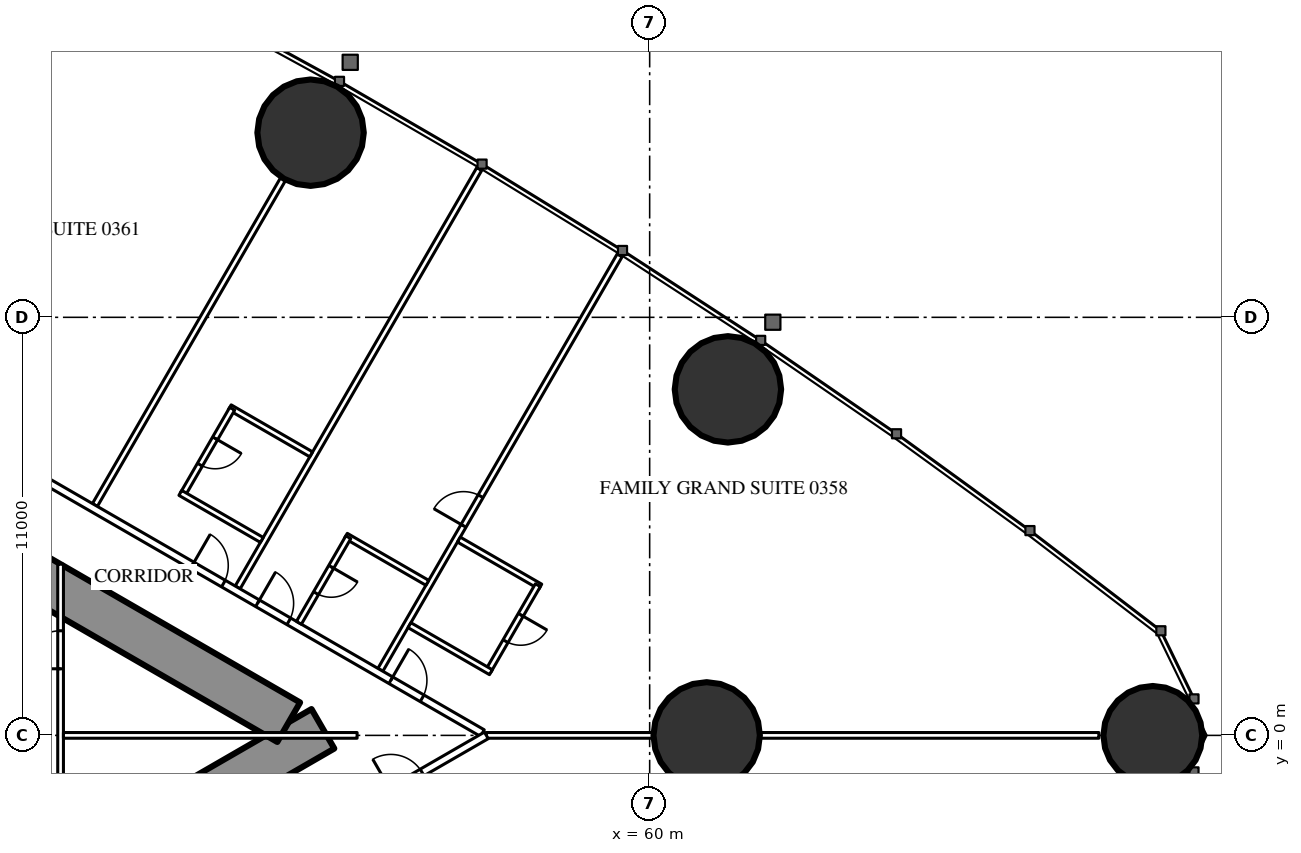
"""IFC4 building model, lengths in metres.
Left out: names, types, materials, properties, quantities, classifications, styles, units other than length and angle.
Written with IfcOpenShell. Run it as: python <this file> out.ifc"""

import sys

from ifc_helpers import new_model, si_unit, direction, frame, frame_2d, origin, origin_2d, place, context, subcontext, project, spatial, rectangle, hollow_circle, extrude, element, fill, save


model = new_model("IFC4")
c1 = context("Model", 3, precision=1e-05, world=origin(), true_north=direction((0.0, 1.0)))
c2 = subcontext(c1, "Body", "Model", "MODEL_VIEW")
j1 = project(units=[si_unit("LENGTHUNIT", "METRE"), si_unit("PLANEANGLEUNIT", "RADIAN")], contexts=[c1])
p1 = place(None, origin())
s1 = spatial("IfcSite", under=j1, at=p1, CompositionType="ELEMENT")
p2 = place(p1, origin())
s2 = spatial("IfcBuilding", under=s1, at=p2, CompositionType="ELEMENT")
p3 = place(p2, frame((0.0, 0.0, 18.0)))
s3 = spatial("IfcBuildingStorey", under=s2, at=p3, CompositionType="ELEMENT", Elevation=18.0)
p4 = place(p3, frame((73.239, 0.0, 0.0), z_axis=(0.0, 0.0, 1.0), x_axis=(1.0, 0.0, 0.0)))
e1 = element("IfcColumn", 1, at=p4, inside=s3, PredefinedType="COLUMN", context=c2, shape_type="SweptSolid", body=[
    extrude(hollow_circle(Radius=1.3, WallThickness=0.1, at=origin_2d()), origin(), (0.0, 0.0, 1.0), 3.5),
])
for number, where, z_axis, x_axis in (
    (2, (62.059, 9.105, 0.0), (0.0, 0.0, 1.0), (1.0, 0.0, 0.0)),
    (3, (51.078, 15.858, 0.0), (0.0, 0.0, 1.0), (1.0, 0.0, 0.0)),
):
    element("IfcColumn", number, at=place(p3, frame(where, z_axis=z_axis, x_axis=x_axis)), inside=s3, PredefinedType="COLUMN", context=c2, shape_type="SweptSolid", body=[
        extrude(hollow_circle(Radius=1.4, WallThickness=0.12, at=origin_2d()), origin(), (0.0, 0.0, 1.0), 3.5),
    ])
p5 = place(p3, frame((61.5, 0.0, 0.0), z_axis=(0.0, 0.0, 1.0), x_axis=(1.0, 0.0, 0.0)))
e4 = element("IfcColumn", 4, at=p5, inside=s3, PredefinedType="COLUMN", context=c2, shape_type="SweptSolid", body=[
    extrude(hollow_circle(Radius=1.4, WallThickness=0.1, at=origin_2d()), origin(), (0.0, 0.0, 1.0), 3.5),
])
p6 = place(p3, frame((27.2, -13.8, 0.0), z_axis=(0.0, 0.0, 1.0), x_axis=(0.866027159892, 0.499996958321, 0.0)))
e5 = element("IfcWall", 5, at=p6, inside=s3, PredefinedType="SHEAR", context=c2, shape_type="SweptSolid", body=[
    extrude(rectangle(XDim=27.947, YDim=1.2, at=frame_2d((13.973, 0.0))), origin(), (0.0, 0.0, 1.0), 3.5),
])
p7 = place(p6, frame((4.6, 0.0, 0.0)))
e6 = element("IfcOpeningElement", 6, at=p7, cuts=e5, PredefinedType="OPENING", context=c2, shape_type="SweptSolid", body=[
    extrude(rectangle(XDim=1.0, YDim=2.2, at=frame_2d((0.5, 1.1))), frame((0.0, 0.61, 0.0), z_axis=(0.0, -1.0, 0.0), x_axis=(1.0, 0.0, 0.0)), (0.0, 0.0, 1.0), 1.22),
])
p8 = place(p6, frame((13.395, 0.0, 0.0)))
e7 = element("IfcOpeningElement", 7, at=p8, cuts=e5, PredefinedType="OPENING", context=c2, shape_type="SweptSolid", body=[
    extrude(rectangle(XDim=1.8, YDim=2.2, at=frame_2d((0.9, 1.1))), frame((0.0, 0.61, 0.0), z_axis=(0.0, -1.0, 0.0), x_axis=(1.0, 0.0, 0.0)), (0.0, 0.0, 1.0), 1.22),
])
p9 = place(p3, frame((27.2, 13.8, 0.0), z_axis=(0.0, 0.0, 1.0), x_axis=(0.866024515034, -0.500001539357, 0.0)))
e8 = element("IfcWall", 8, at=p9, inside=s3, PredefinedType="SHEAR", context=c2, shape_type="SweptSolid", body=[
    extrude(rectangle(XDim=26.907, YDim=1.2, at=frame_2d((13.454, 0.0))), origin(), (0.0, 0.0, 1.0), 3.5),
])
p10 = place(p9, frame((4.6, 0.0, 0.0)))
e9 = element("IfcOpeningElement", 9, at=p10, cuts=e8, PredefinedType="OPENING", context=c2, shape_type="SweptSolid", body=[
    extrude(rectangle(XDim=1.0, YDim=2.2, at=frame_2d((0.5, 1.1))), frame((0.0, 0.61, 0.0), z_axis=(0.0, -1.0, 0.0), x_axis=(1.0, 0.0, 0.0)), (0.0, 0.0, 1.0), 1.22),
])
p11 = place(p9, frame((13.395, 0.0, 0.0)))
e10 = element("IfcOpeningElement", 10, at=p11, cuts=e8, PredefinedType="OPENING", context=c2, shape_type="SweptSolid", body=[
    extrude(rectangle(XDim=1.8, YDim=2.2, at=frame_2d((0.9, 1.1))), frame((0.0, 0.61, 0.0), z_axis=(0.0, -1.0, 0.0), x_axis=(1.0, 0.0, 0.0)), (0.0, 0.0, 1.0), 1.22),
])
p12 = place(p3, frame((45.403, 6.062, 0.0), z_axis=(0.0, 0.0, 1.0), x_axis=(0.500013434677, 0.866017647131, 0.0)))
e11 = element("IfcWall", 11, at=p12, inside=s3, PredefinedType="PARTITIONING", context=c2, shape_type="SweptSolid", body=[
    extrude(rectangle(XDim=9.902, YDim=0.15, at=frame_2d((4.951, 0.0))), origin(), (0.0, 0.0, 1.0), 2.25),
])
p13 = place(p3, frame((49.159, 3.893, 0.0), z_axis=(0.0, 0.0, 1.0), x_axis=(0.499995664361, 0.866027906952, 0.0)))
e12 = element("IfcWall", 12, at=p13, inside=s3, PredefinedType="PARTITIONING", context=c2, shape_type="SweptSolid", body=[
    extrude(rectangle(XDim=12.711, YDim=0.15, at=frame_2d((6.356, 0.0))), origin(), (0.0, 0.0, 1.0), 3.25),
])
p14 = place(p3, frame((52.915, 1.725, 0.0), z_axis=(0.0, 0.0, 1.0), x_axis=(0.499997163113, 0.866027041656, 0.0)))
e13 = element("IfcWall", 13, at=p14, inside=s3, PredefinedType="PARTITIONING", context=c2, shape_type="SweptSolid", body=[
    extrude(rectangle(XDim=12.591, YDim=0.15, at=frame_2d((6.295, 0.0))), origin(), (0.0, 0.0, 1.0), 3.25),
])
p15 = place(p14, frame((4.375, 0.0, 0.0)))
e14 = element("IfcOpeningElement", 14, at=p15, cuts=e13, PredefinedType="OPENING", context=c2, shape_type="SweptSolid", body=[
    extrude(rectangle(XDim=0.9, YDim=2.2, at=frame_2d((0.45, 1.1))), frame((0.0, 0.085, 0.0), z_axis=(0.0, -1.0, 0.0), x_axis=(1.0, 0.0, 0.0)), (0.0, 0.0, 1.0), 0.17),
])
p16 = place(p3, frame((55.702, 0.0, 0.0), z_axis=(0.0, 0.0, 1.0), x_axis=(1.0, 0.0, 0.0)))
e15 = element("IfcWall", 15, at=p16, inside=s3, PredefinedType="PARTITIONING", context=c2, shape_type="SweptSolid", body=[
    extrude(rectangle(XDim=16.117, YDim=0.15, at=frame_2d((8.059, 0.0))), origin(), (0.0, 0.0, 1.0), 2.25),
])
p17 = place(p3, frame((36.834, 10.894, 0.0), z_axis=(0.0, 0.0, 1.0), x_axis=(0.866028157229, -0.499995230863, 0.0)))
e16 = element("IfcWall", 16, at=p17, inside=s3, PredefinedType="PARTITIONING", context=c2, shape_type="SweptSolid", body=[
    extrude(rectangle(XDim=21.667, YDim=0.2, at=frame_2d((10.833, 0.0))), origin(), (0.0, 0.0, 1.0), 3.25),
])
p18 = place(p17, frame((18.885, 0.0, 0.0)))
e17 = element("IfcOpeningElement", 17, at=p18, cuts=e16, PredefinedType="OPENING", context=c2, shape_type="SweptSolid", body=[
    extrude(rectangle(XDim=0.95, YDim=2.2, at=frame_2d((0.475, 1.1))), frame((0.0, 0.11, 0.0), z_axis=(0.0, -1.0, 0.0), x_axis=(1.0, 0.0, 0.0)), (0.0, 0.0, 1.0), 0.22),
])
p19 = place(p17, frame((14.835, 0.0, 0.0)))
e18 = element("IfcOpeningElement", 18, at=p19, cuts=e16, PredefinedType="OPENING", context=c2, shape_type="SweptSolid", body=[
    extrude(rectangle(XDim=0.95, YDim=2.2, at=frame_2d((0.475, 1.1))), frame((0.0, 0.11, 0.0), z_axis=(0.0, -1.0, 0.0), x_axis=(1.0, 0.0, 0.0)), (0.0, 0.0, 1.0), 0.22),
])
p20 = place(p17, frame((12.85, 0.0, 0.0)))
e19 = element("IfcOpeningElement", 19, at=p20, cuts=e16, PredefinedType="OPENING", context=c2, shape_type="SweptSolid", body=[
    extrude(rectangle(XDim=0.95, YDim=2.2, at=frame_2d((0.475, 1.1))), frame((0.0, 0.11, 0.0), z_axis=(0.0, -1.0, 0.0), x_axis=(1.0, 0.0, 0.0)), (0.0, 0.0, 1.0), 0.22),
])
p21 = place(p17, frame((1.542, 0.0, 0.0)))
e20 = element("IfcOpeningElement", 20, at=p21, cuts=e16, PredefinedType="OPENING", context=c2, shape_type="SweptSolid", body=[
    extrude(rectangle(XDim=0.95, YDim=2.2, at=frame_2d((0.475, 1.1))), frame((0.0, 0.11, 0.0), z_axis=(0.0, -1.0, 0.0), x_axis=(1.0, 0.0, 0.0)), (0.0, 0.0, 1.0), 0.22),
])
p22 = place(p3, frame((49.131, -3.794, 0.0), z_axis=(0.0, 0.0, 1.0), x_axis=(0.866030732979, 0.499990769451, 0.0)))
e21 = element("IfcWall", 21, at=p22, inside=s3, PredefinedType="PARTITIONING", context=c2, shape_type="SweptSolid", body=[
    extrude(rectangle(XDim=7.588, YDim=0.2, at=frame_2d((3.794, 0.0))), origin(), (0.0, 0.0, 1.0), 3.25),
])
p23 = place(p22, frame((2.986, 0.0, 0.0)))
e22 = element("IfcOpeningElement", 22, at=p23, cuts=e21, PredefinedType="OPENING", context=c2, shape_type="SweptSolid", body=[
    extrude(rectangle(XDim=0.95, YDim=2.2, at=frame_2d((0.475, 1.1))), frame((0.0, 0.11, 0.0), z_axis=(0.0, -1.0, 0.0), x_axis=(1.0, 0.0, 0.0)), (0.0, 0.0, 1.0), 0.22),
])
p24 = place(p22, frame((4.686, 0.0, 0.0)))
e23 = element("IfcOpeningElement", 23, at=p24, cuts=e21, PredefinedType="OPENING", context=c2, shape_type="SweptSolid", body=[
    extrude(rectangle(XDim=0.95, YDim=2.2, at=frame_2d((0.475, 1.1))), frame((0.0, 0.11, 0.0), z_axis=(0.0, -1.0, 0.0), x_axis=(1.0, 0.0, 0.0)), (0.0, 0.0, 1.0), 0.22),
])
p25 = place(p3, frame((54.98, 5.151, 0.0), z_axis=(0.0, 0.0, 1.0), x_axis=(0.86604923931, -0.499958713387, 0.0)))
e24 = element("IfcWall", 24, at=p25, inside=s3, PredefinedType="PARTITIONING", context=c2, shape_type="SweptSolid", body=[
    extrude(rectangle(XDim=2.475, YDim=0.15, at=frame_2d((1.237, 0.0))), origin(), (0.0, 0.0, 1.0), 3.25),
])
p26 = place(p3, frame((55.758, 1.7, 0.0), z_axis=(0.0, 0.0, 1.0), x_axis=(0.500006934395, 0.866021400173, 0.0)))
e25 = element("IfcWall", 25, at=p26, inside=s3, PredefinedType="PARTITIONING", context=c2, shape_type="SweptSolid", body=[
    extrude(rectangle(XDim=2.6, YDim=0.15, at=frame_2d((1.3, 0.0))), origin(), (0.0, 0.0, 1.0), 3.25),
])
p27 = place(p26, frame((0.9, 0.0, 0.0)))
e26 = element("IfcOpeningElement", 26, at=p27, cuts=e25, PredefinedType="OPENING", context=c2, shape_type="SweptSolid", body=[
    extrude(rectangle(XDim=0.8, YDim=2.2, at=frame_2d((0.4, 1.1))), frame((0.0, 0.085, 0.0), z_axis=(0.0, -1.0, 0.0), x_axis=(1.0, 0.0, 0.0)), (0.0, 0.0, 1.0), 0.17),
])
for number, where, z_axis, x_axis in (
    (27, (53.68, 2.9, 0.0), (0.0, 0.0, 1.0), (0.866, -0.5, 0.0)),
    (28, (52.006, 5.251, 0.0), (0.0, 0.0, 1.0), (0.866, -0.5, 0.0)),
):
    element("IfcWall", number, at=place(p3, frame(where, z_axis=z_axis, x_axis=x_axis)), inside=s3, PredefinedType="PARTITIONING", context=c2, shape_type="SweptSolid", body=[
        extrude(rectangle(XDim=2.475, YDim=0.15, at=frame_2d((1.237, 0.0))), origin(), (0.0, 0.0, 1.0), 3.25),
    ])
p28 = place(p3, frame((50.771, 2.962, 0.0), z_axis=(0.0, 0.0, 1.0), x_axis=(0.500006934395, 0.866021400173, 0.0)))
e29 = element("IfcWall", 29, at=p28, inside=s3, PredefinedType="PARTITIONING", context=c2, shape_type="SweptSolid", body=[
    extrude(rectangle(XDim=2.6, YDim=0.15, at=frame_2d((1.3, 0.0))), origin(), (0.0, 0.0, 1.0), 3.25),
])
p29 = place(p28, frame((0.9, 0.0, 0.0)))
e30 = element("IfcOpeningElement", 30, at=p29, cuts=e29, PredefinedType="OPENING", context=c2, shape_type="SweptSolid", body=[
    extrude(rectangle(XDim=0.8, YDim=2.2, at=frame_2d((0.4, 1.1))), frame((0.0, 0.085, 0.0), z_axis=(0.0, -1.0, 0.0), x_axis=(1.0, 0.0, 0.0)), (0.0, 0.0, 1.0), 0.17),
])
p30 = place(p3, frame((48.951, 8.632, 0.0), z_axis=(0.0, 0.0, 1.0), x_axis=(0.866006523861, -0.500032699561, 0.0)))
e31 = element("IfcWall", 31, at=p30, inside=s3, PredefinedType="PARTITIONING", context=c2, shape_type="SweptSolid", body=[
    extrude(rectangle(XDim=2.475, YDim=0.15, at=frame_2d((1.237, 0.0))), origin(), (0.0, 0.0, 1.0), 3.25),
])
p31 = place(p3, frame((47.716, 6.343, 0.0), z_axis=(0.0, 0.0, 1.0), x_axis=(0.500006934395, 0.866021400173, 0.0)))
e32 = element("IfcWall", 32, at=p31, inside=s3, PredefinedType="PARTITIONING", context=c2, shape_type="SweptSolid", body=[
    extrude(rectangle(XDim=2.6, YDim=0.15, at=frame_2d((1.3, 0.0))), origin(), (0.0, 0.0, 1.0), 3.25),
])
p32 = place(p31, frame((0.9, 0.0, 0.0)))
e33 = element("IfcOpeningElement", 33, at=p32, cuts=e32, PredefinedType="OPENING", context=c2, shape_type="SweptSolid", body=[
    extrude(rectangle(XDim=0.8, YDim=2.2, at=frame_2d((0.4, 1.1))), frame((0.0, 0.085, 0.0), z_axis=(0.0, -1.0, 0.0), x_axis=(1.0, 0.0, 0.0)), (0.0, 0.0, 1.0), 0.17),
])
p33 = place(p3, frame((47.651, 6.38, 0.0), z_axis=(0.0, 0.0, 1.0), x_axis=(0.866031185235, -0.4999899861, 0.0)))
e34 = element("IfcWall", 34, at=p33, inside=s3, PredefinedType="PARTITIONING", context=c2, shape_type="SweptSolid", body=[
    extrude(rectangle(XDim=2.475, YDim=0.15, at=frame_2d((1.238, 0.0))), origin(), (0.0, 0.0, 1.0), 3.25),
])
p34 = place(p3, frame((44.5, -4.505, 0.0), z_axis=(0.0, 0.0, 1.0), x_axis=(0.0, 1.0, 0.0)))
e35 = element("IfcWall", 35, at=p34, inside=s3, PredefinedType="PARTITIONING", context=c2, shape_type="SweptSolid", body=[
    extrude(rectangle(XDim=9.009, YDim=0.15, at=frame_2d((4.505, 0.0))), origin(), (0.0, 0.0, 1.0), 2.35),
])
p35 = place(p34, frame((1.752, 0.0, 0.0)))
e36 = element("IfcOpeningElement", 36, at=p35, cuts=e35, PredefinedType="OPENING", context=c2, shape_type="SweptSolid", body=[
    extrude(rectangle(XDim=1.0, YDim=2.2, at=frame_2d((0.5, 1.1))), frame((0.0, 0.085, 0.0), z_axis=(0.0, -1.0, 0.0), x_axis=(1.0, 0.0, 0.0)), (0.0, 0.0, 1.0), 0.17),
])
p36 = place(p34, frame((6.257, 0.0, 0.0)))
e37 = element("IfcOpeningElement", 37, at=p36, cuts=e35, PredefinedType="OPENING", context=c2, shape_type="SweptSolid", body=[
    extrude(rectangle(XDim=1.0, YDim=2.2, at=frame_2d((0.5, 1.1))), frame((0.0, 0.085, 0.0), z_axis=(0.0, -1.0, 0.0), x_axis=(1.0, 0.0, 0.0)), (0.0, 0.0, 1.0), 0.17),
])
p37 = place(p3, frame((44.575, 0.0, 0.0), z_axis=(0.0, 0.0, 1.0), x_axis=(1.0, 0.0, 0.0)))
e38 = element("IfcWall", 38, at=p37, inside=s3, PredefinedType="PARTITIONING", context=c2, shape_type="SweptSolid", body=[
    extrude(rectangle(XDim=7.727, YDim=0.15, at=frame_2d((3.864, 0.0))), origin(), (0.0, 0.0, 1.0), 2.25),
])
p38 = place(p24, origin())
e39 = element("IfcDoor", 39, at=p38, inside=s3, OperationType="SINGLE_SWING_LEFT", PredefinedType="DOOR", context=c2, shape_type="SweptSolid", body=[
    extrude(rectangle(XDim=0.95, YDim=2.2, at=frame_2d((0.475, 1.1))), frame((0.0, 0.025, 0.0), z_axis=(0.0, -1.0, 0.0), x_axis=(1.0, 0.0, 0.0)), (0.0, 0.0, 1.0), 0.05),
])
fill(e23, e39)
p39 = place(p27, origin())
e40 = element("IfcDoor", 40, at=p39, inside=s3, OperationType="SINGLE_SWING_RIGHT", PredefinedType="DOOR", context=c2, shape_type="SweptSolid", body=[
    extrude(rectangle(XDim=0.8, YDim=2.2, at=frame_2d((0.4, 1.1))), frame((0.0, 0.025, 0.0), z_axis=(0.0, -1.0, 0.0), x_axis=(1.0, 0.0, 0.0)), (0.0, 0.0, 1.0), 0.05),
])
fill(e26, e40)
p40 = place(p18, origin())
e41 = element("IfcDoor", 41, at=p40, inside=s3, OperationType="SINGLE_SWING_LEFT", PredefinedType="DOOR", context=c2, shape_type="SweptSolid", body=[
    extrude(rectangle(XDim=0.95, YDim=2.2, at=frame_2d((0.475, 1.1))), frame((0.0, 0.025, 0.0), z_axis=(0.0, -1.0, 0.0), x_axis=(1.0, 0.0, 0.0)), (0.0, 0.0, 1.0), 0.05),
])
fill(e17, e41)
p41 = place(p29, origin())
e42 = element("IfcDoor", 42, at=p41, inside=s3, OperationType="SINGLE_SWING_RIGHT", PredefinedType="DOOR", context=c2, shape_type="SweptSolid", body=[
    extrude(rectangle(XDim=0.8, YDim=2.2, at=frame_2d((0.4, 1.1))), frame((0.0, 0.025, 0.0), z_axis=(0.0, -1.0, 0.0), x_axis=(1.0, 0.0, 0.0)), (0.0, 0.0, 1.0), 0.05),
])
fill(e30, e42)
p42 = place(p19, origin())
e43 = element("IfcDoor", 43, at=p42, inside=s3, OperationType="SINGLE_SWING_LEFT", PredefinedType="DOOR", context=c2, shape_type="SweptSolid", body=[
    extrude(rectangle(XDim=0.95, YDim=2.2, at=frame_2d((0.475, 1.1))), frame((0.0, 0.025, 0.0), z_axis=(0.0, -1.0, 0.0), x_axis=(1.0, 0.0, 0.0)), (0.0, 0.0, 1.0), 0.05),
])
fill(e18, e43)
p43 = place(p32, origin())
e44 = element("IfcDoor", 44, at=p43, inside=s3, OperationType="SINGLE_SWING_RIGHT", PredefinedType="DOOR", context=c2, shape_type="SweptSolid", body=[
    extrude(rectangle(XDim=0.8, YDim=2.2, at=frame_2d((0.4, 1.1))), frame((0.0, 0.025, 0.0), z_axis=(0.0, -1.0, 0.0), x_axis=(1.0, 0.0, 0.0)), (0.0, 0.0, 1.0), 0.05),
])
fill(e33, e44)
p44 = place(p20, origin())
e45 = element("IfcDoor", 45, at=p44, inside=s3, OperationType="SINGLE_SWING_LEFT", PredefinedType="DOOR", context=c2, shape_type="SweptSolid", body=[
    extrude(rectangle(XDim=0.95, YDim=2.2, at=frame_2d((0.475, 1.1))), frame((0.0, 0.025, 0.0), z_axis=(0.0, -1.0, 0.0), x_axis=(1.0, 0.0, 0.0)), (0.0, 0.0, 1.0), 0.05),
])
fill(e19, e45)
p45 = place(p15, origin())
e46 = element("IfcDoor", 46, at=p45, inside=s3, OperationType="SINGLE_SWING_LEFT", PredefinedType="DOOR", context=c2, shape_type="SweptSolid", body=[
    extrude(rectangle(XDim=0.9, YDim=2.2, at=frame_2d((0.45, 1.1))), frame((0.0, 0.025, 0.0), z_axis=(0.0, -1.0, 0.0), x_axis=(1.0, 0.0, 0.0)), (0.0, 0.0, 1.0), 0.05),
])
fill(e14, e46)
p46 = place(p36, origin())
e47 = element("IfcDoor", 47, at=p46, inside=s3, OperationType="SINGLE_SWING_LEFT", PredefinedType="DOOR", context=c2, shape_type="SweptSolid", body=[
    extrude(rectangle(XDim=1.0, YDim=2.2, at=frame_2d((0.5, 1.1))), frame((0.0, 0.025, 0.0), z_axis=(0.0, -1.0, 0.0), x_axis=(1.0, 0.0, 0.0)), (0.0, 0.0, 1.0), 0.05),
])
fill(e37, e47)
save(model, sys.argv[1])
